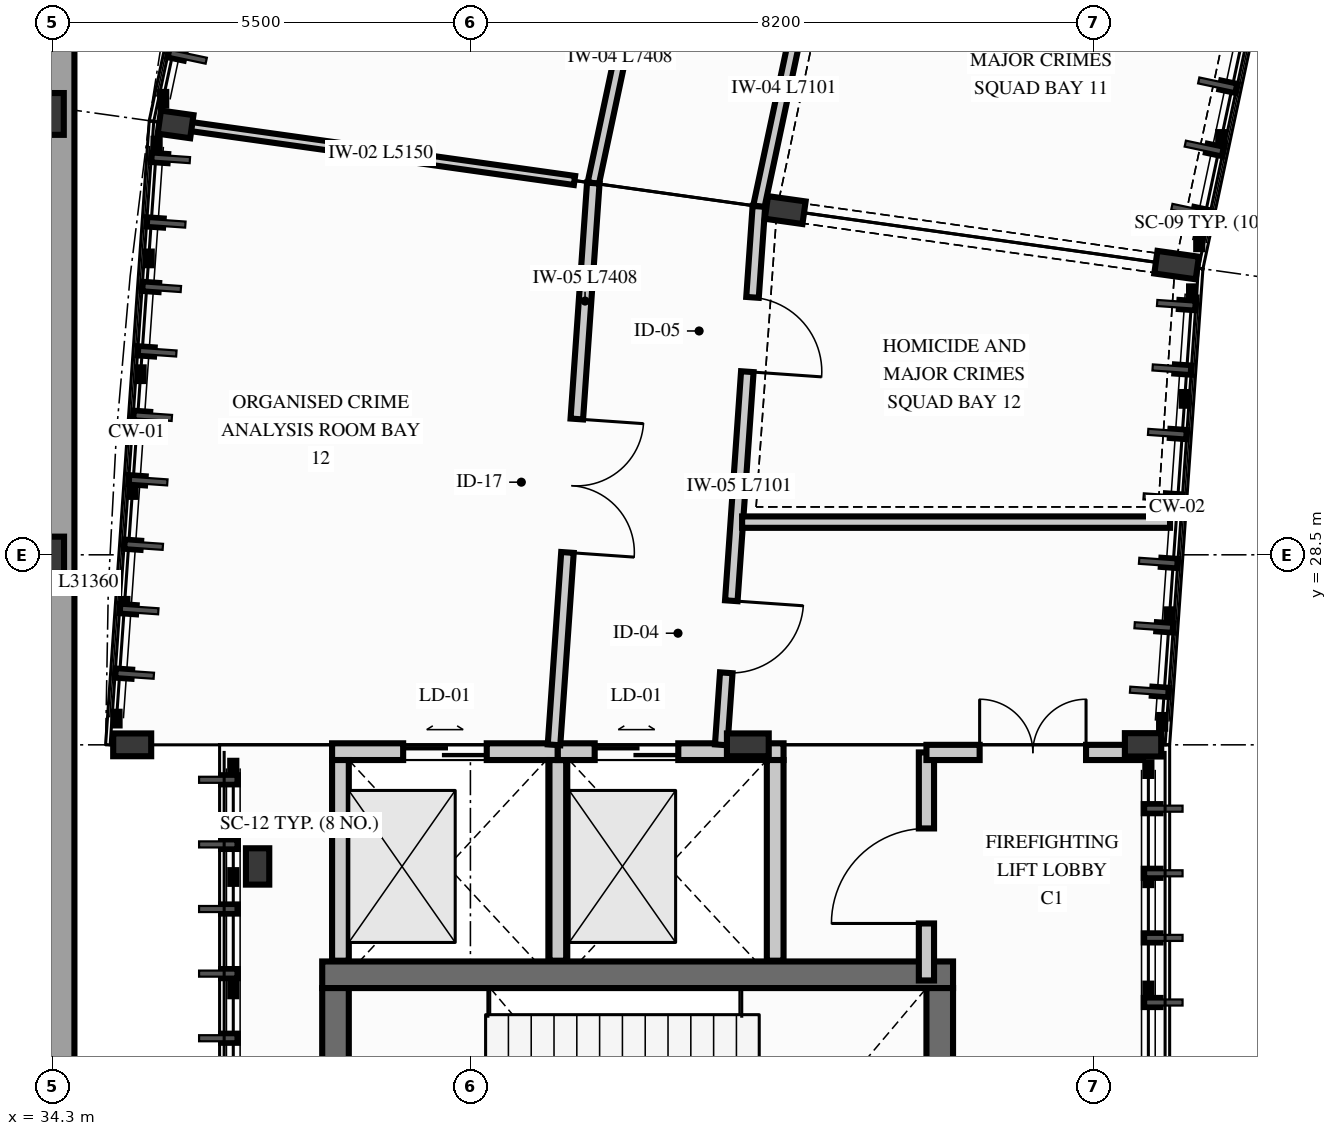
"""IFC4 building model, lengths in metres.
Left out: names, types, materials, properties, quantities, classifications, styles, units other than length and angle.
Written with IfcOpenShell. Run it as: python <this file> out.ifc"""

import sys

from ifc_helpers import new_model, si_unit, direction, frame, frame_2d, origin, origin_2d, place, context, subcontext, project, spatial, rectangle, i_section, extrude, element, fill, save


model = new_model("IFC4")
c1 = context("Model", 3, precision=1e-05, world=origin(), true_north=direction((0.0, 1.0)))
c2 = subcontext(c1, "Body", "Model", "MODEL_VIEW")
j1 = project(units=[si_unit("LENGTHUNIT", "METRE"), si_unit("PLANEANGLEUNIT", "RADIAN")], contexts=[c1])
p1 = place(None, origin())
s1 = spatial("IfcSite", under=j1, at=p1, CompositionType="ELEMENT")
p2 = place(p1, origin())
s2 = spatial("IfcBuilding", under=s1, at=p2, CompositionType="ELEMENT")
p3 = place(p2, frame((0.0, 0.0, 9.3)))
s3 = spatial("IfcBuildingStorey", under=s2, at=p3, CompositionType="ELEMENT", Elevation=9.3)
p4 = place(p3, frame((37.85, 22.975, 0.0), z_axis=(0.0, 0.0, 1.0), x_axis=(1.0, 0.0, 0.0)))
e1 = element("IfcWall", 1, at=p4, inside=s3, PredefinedType="SHEAR", context=c2, shape_type="SweptSolid", body=[
    extrude(rectangle(XDim=8.3, YDim=0.35, at=frame_2d((4.15, 0.0))), origin(), (0.0, 0.0, 1.0), 4.0),
])
p5 = place(p3, frame((38.025, 16.0, 0.0), z_axis=(0.0, 0.0, 1.0), x_axis=(0.0, 1.0, 0.0)))
e2 = element("IfcWall", 2, at=p5, inside=s3, PredefinedType="SHEAR", context=c2, shape_type="SweptSolid", body=[
    extrude(rectangle(XDim=6.8, YDim=0.35, at=frame_2d((3.4, 0.0))), origin(), (0.0, 0.0, 1.0), 4.0),
])
p6 = place(p5, frame((2.6, 0.0, 0.0)))
e3 = element("IfcOpeningElement", 3, at=p6, cuts=e2, PredefinedType="OPENING", context=c2, shape_type="SweptSolid", body=[
    extrude(rectangle(XDim=1.25, YDim=2.2, at=frame_2d((0.625, 1.1))), frame((0.0, 0.185, 0.0), z_axis=(0.0, -1.0, 0.0), x_axis=(1.0, 0.0, 0.0)), (0.0, 0.0, 1.0), 0.37),
])
p7 = place(p3, frame((45.975, 16.0, 0.0), z_axis=(0.0, 0.0, 1.0), x_axis=(0.0, 1.0, 0.0)))
e4 = element("IfcWall", 4, at=p7, inside=s3, PredefinedType="SHEAR", context=c2, shape_type="SweptSolid", body=[
    extrude(rectangle(XDim=6.8, YDim=0.35, at=frame_2d((3.4, 0.0))), origin(), (0.0, 0.0, 1.0), 4.0),
])
p8 = place(p3, frame((49.091, 32.312, 0.0), z_axis=(0.0, 0.0, 1.0), x_axis=(0.13917310096, 0.990268068742, 0.0)))
e5 = element("IfcColumn", 5, at=p8, inside=s3, PredefinedType="COLUMN", context=c2, shape_type="SweptSolid", body=[
    extrude(i_section(OverallWidth=0.3, OverallDepth=0.55, WebThickness=0.015, FlangeThickness=0.029, FilletRadius=0.027, at=origin_2d()), origin(), (0.0, 0.0, 1.0), 4.2),
])
p9 = place(p3, frame((43.942, 33.035, 0.0), z_axis=(0.0, 0.0, 1.0), x_axis=(0.13917310096, 0.990268068742, 0.0)))
e6 = element("IfcColumn", 6, at=p9, inside=s3, PredefinedType="COLUMN", context=c2, shape_type="SweptSolid", body=[
    extrude(i_section(OverallWidth=0.3, OverallDepth=0.5, WebThickness=0.014, FlangeThickness=0.028, FilletRadius=0.027, at=origin_2d()), origin(), (0.0, 0.0, 1.0), 4.2),
])
p10 = place(p3, frame((35.921, 34.163, 0.0), z_axis=(0.0, 0.0, 1.0), x_axis=(0.13917310096, 0.990268068742, 0.0)))
e7 = element("IfcColumn", 7, at=p10, inside=s3, PredefinedType="COLUMN", context=c2, shape_type="SweptSolid", body=[
    extrude(i_section(OverallWidth=0.307, OverallDepth=0.432, WebThickness=0.021, FlangeThickness=0.04, FilletRadius=0.027, at=origin_2d()), origin(), (0.0, 0.0, 1.0), 4.2),
])
p11 = place(p3, frame((48.65, 26.0, 0.0), z_axis=(0.0, 0.0, 1.0), x_axis=(0.0, 1.0, 0.0)))
e8 = element("IfcColumn", 8, at=p11, inside=s3, PredefinedType="COLUMN", context=c2, shape_type="SweptSolid", body=[
    extrude(i_section(OverallWidth=0.307, OverallDepth=0.478, WebThickness=0.021, FlangeThickness=0.04, FilletRadius=0.027, at=origin_2d()), origin(), (0.0, 0.0, 1.0), 4.2),
])
p12 = place(p3, frame((43.45, 26.0, 0.0), z_axis=(0.0, 0.0, 1.0), x_axis=(0.0, 1.0, 0.0)))
e9 = element("IfcColumn", 9, at=p12, inside=s3, PredefinedType="COLUMN", context=c2, shape_type="SweptSolid", body=[
    extrude(i_section(OverallWidth=0.3, OverallDepth=0.55, WebThickness=0.015, FlangeThickness=0.029, FilletRadius=0.027, at=origin_2d()), origin(), (0.0, 0.0, 1.0), 4.2),
])
p13 = place(p3, frame((35.35, 26.0, 0.0), z_axis=(0.0, 0.0, 1.0), x_axis=(0.0, 1.0, 0.0)))
e10 = element("IfcColumn", 10, at=p13, inside=s3, PredefinedType="COLUMN", context=c2, shape_type="SweptSolid", body=[
    extrude(i_section(OverallWidth=0.3, OverallDepth=0.5, WebThickness=0.014, FlangeThickness=0.028, FilletRadius=0.027, at=origin_2d()), origin(), (0.0, 0.0, 1.0), 4.2),
])
p14 = place(p3, frame((37.0, 24.4, 0.0), z_axis=(0.0, 0.0, 1.0), x_axis=(1.0, 0.0, 0.0)))
e11 = element("IfcColumn", 11, at=p14, inside=s3, PredefinedType="COLUMN", context=c2, shape_type="SweptSolid", body=[
    extrude(i_section(OverallWidth=0.307, OverallDepth=0.478, WebThickness=0.021, FlangeThickness=0.04, FilletRadius=0.027, at=origin_2d()), origin(), (0.0, 0.0, 1.0), 4.2),
])
p15 = place(p3, frame((34.3, 28.5, 0.0), z_axis=(0.0, 0.0, 1.0), x_axis=(1.0, 0.0, 0.0)))
e12 = element("IfcColumn", 12, at=p15, inside=s3, PredefinedType="COLUMN", context=c2, shape_type="SweptSolid", body=[
    extrude(i_section(OverallWidth=0.307, OverallDepth=0.478, WebThickness=0.021, FlangeThickness=0.04, FilletRadius=0.027, at=origin_2d()), origin(), (0.0, 0.0, 1.0), 3.94),
])
p16 = place(p3, frame((34.3, 34.3, 0.0), z_axis=(0.0, 0.0, 1.0), x_axis=(1.0, 0.0, 0.0)))
e13 = element("IfcColumn", 13, at=p16, inside=s3, PredefinedType="COLUMN", context=c2, shape_type="SweptSolid", body=[
    extrude(i_section(OverallWidth=0.3, OverallDepth=0.55, WebThickness=0.015, FlangeThickness=0.029, FilletRadius=0.027, at=origin_2d()), origin(), (0.0, 0.0, 1.0), 3.94),
])
p17 = place(p3, frame((34.38, 4.93, 0.0), z_axis=(0.0, 0.0, 1.0), x_axis=(0.0, 1.0, 0.0)))
e14 = element("IfcWall", 14, at=p17, inside=s3, PredefinedType="SOLIDWALL", context=c2, shape_type="SweptSolid", body=[
    extrude(rectangle(XDim=31.36, YDim=0.42, at=frame_2d((15.68, 0.0))), origin(), (0.0, 0.0, 1.0), 3.62),
])
p18 = place(p17, frame((1.65, 0.0, 0.85)))
e15 = element("IfcOpeningElement", 15, at=p18, cuts=e14, PredefinedType="OPENING", context=c2, shape_type="SweptSolid", body=[
    extrude(rectangle(XDim=1.3, YDim=2.15, at=frame_2d((0.65, 1.075))), frame((0.0, 0.22, 0.0), z_axis=(0.0, -1.0, 0.0), x_axis=(1.0, 0.0, 0.0)), (0.0, 0.0, 1.0), 0.44),
])
p19 = place(p17, frame((9.65, 0.0, 0.74)))
e16 = element("IfcOpeningElement", 16, at=p19, cuts=e14, PredefinedType="OPENING", context=c2, shape_type="SweptSolid", body=[
    extrude(rectangle(XDim=1.6, YDim=2.4, at=frame_2d((0.8, 1.2))), frame((0.0, 0.22, 0.0), z_axis=(0.0, -1.0, 0.0), x_axis=(1.0, 0.0, 0.0)), (0.0, 0.0, 1.0), 0.44),
])
p20 = place(p17, frame((13.65, 0.0, 0.85)))
e17 = element("IfcOpeningElement", 17, at=p20, cuts=e14, PredefinedType="OPENING", context=c2, shape_type="SweptSolid", body=[
    extrude(rectangle(XDim=1.4, YDim=2.2, at=frame_2d((0.7, 1.1))), frame((0.0, 0.22, 0.0), z_axis=(0.0, -1.0, 0.0), x_axis=(1.0, 0.0, 0.0)), (0.0, 0.0, 1.0), 0.44),
])
p21 = place(p3, frame((37.98, 25.91, 0.0), z_axis=(0.0, 0.0, 1.0), x_axis=(1.0, 0.0, 0.0)))
e18 = element("IfcWall", 18, at=p21, inside=s3, PredefinedType="PARTITIONING", context=c2, shape_type="SweptSolid", body=[
    extrude(rectangle(XDim=2.97, YDim=0.22, at=frame_2d((1.485, 0.0))), origin(), (0.0, 0.0, 1.0), 3.55),
])
p22 = place(p21, frame((0.935, 0.0, 0.0)))
e19 = element("IfcOpeningElement", 19, at=p22, cuts=e18, PredefinedType="OPENING", context=c2, shape_type="SweptSolid", body=[
    extrude(rectangle(XDim=1.1, YDim=2.15, at=frame_2d((0.55, 1.075))), frame((0.0, 0.12, 0.0), z_axis=(0.0, -1.0, 0.0), x_axis=(1.0, 0.0, 0.0)), (0.0, 0.0, 1.0), 0.24),
])
for number, where, z_axis, x_axis in (
    (20, (38.09, 23.16, 0.0), (0.0, 0.0, 1.0), (0.0, 1.0, 0.0)),
    (21, (40.95, 23.16, 0.0), (0.0, 0.0, 1.0), (0.0, 1.0, 0.0)),
):
    element("IfcWall", number, at=place(p3, frame(where, z_axis=z_axis, x_axis=x_axis)), inside=s3, PredefinedType="PARTITIONING", context=c2, shape_type="SweptSolid", body=[
        extrude(rectangle(XDim=2.64, YDim=0.22, at=frame_2d((1.32, 0.0))), origin(), (0.0, 0.0, 1.0), 3.92),
    ])
p23 = place(p3, frame((40.95, 25.91, 0.0), z_axis=(0.0, 0.0, 1.0), x_axis=(1.0, 0.0, 0.0)))
e22 = element("IfcWall", 22, at=p23, inside=s3, PredefinedType="PARTITIONING", context=c2, shape_type="SweptSolid", body=[
    extrude(rectangle(XDim=2.97, YDim=0.22, at=frame_2d((1.485, 0.0))), origin(), (0.0, 0.0, 1.0), 3.55),
])
p24 = place(p23, frame((0.485, 0.0, 0.0)))
e23 = element("IfcOpeningElement", 23, at=p24, cuts=e22, PredefinedType="OPENING", context=c2, shape_type="SweptSolid", body=[
    extrude(rectangle(XDim=1.1, YDim=2.15, at=frame_2d((0.55, 1.075))), frame((0.0, 0.12, 0.0), z_axis=(0.0, -1.0, 0.0), x_axis=(1.0, 0.0, 0.0)), (0.0, 0.0, 1.0), 0.24),
])
p25 = place(p3, frame((43.81, 23.16, 0.0), z_axis=(0.0, 0.0, 1.0), x_axis=(0.0, 1.0, 0.0)))
e24 = element("IfcWall", 24, at=p25, inside=s3, PredefinedType="PARTITIONING", context=c2, shape_type="SweptSolid", body=[
    extrude(rectangle(XDim=2.64, YDim=0.22, at=frame_2d((1.32, 0.0))), origin(), (0.0, 0.0, 1.0), 3.92),
])
p26 = place(p3, frame((45.8, 22.9, 0.0), z_axis=(0.0, 0.0, 1.0), x_axis=(0.0, 1.0, 0.0)))
e25 = element("IfcWall", 25, at=p26, inside=s3, PredefinedType="PARTITIONING", context=c2, shape_type="SweptSolid", body=[
    extrude(rectangle(XDim=3.0, YDim=0.2, at=frame_2d((1.5, 0.0))), origin(), (0.0, 0.0, 1.0), 3.92),
])
p27 = place(p26, frame((0.75, 0.0, 0.0)))
e26 = element("IfcOpeningElement", 26, at=p27, cuts=e25, PredefinedType="OPENING", context=c2, shape_type="SweptSolid", body=[
    extrude(rectangle(XDim=1.25, YDim=2.2, at=frame_2d((0.625, 1.1))), frame((0.0, 0.11, 0.0), z_axis=(0.0, -1.0, 0.0), x_axis=(1.0, 0.0, 0.0)), (0.0, 0.0, 1.0), 0.22),
])
p28 = place(p3, frame((45.8, 25.9, 0.0), z_axis=(0.0, 0.0, 1.0), x_axis=(1.0, 0.0, 0.0)))
e27 = element("IfcWall", 27, at=p28, inside=s3, PredefinedType="PARTITIONING", context=c2, shape_type="SweptSolid", body=[
    extrude(rectangle(XDim=2.85, YDim=0.2, at=frame_2d((1.425, 0.0))), origin(), (0.0, 0.0, 1.0), 3.6),
])
p29 = place(p28, frame((0.7, 0.0, 0.0)))
e28 = element("IfcOpeningElement", 28, at=p29, cuts=e27, PredefinedType="OPENING", context=c2, shape_type="SweptSolid", body=[
    extrude(rectangle(XDim=1.4, YDim=2.25, at=frame_2d((0.7, 1.125))), frame((0.0, 0.11, 0.0), z_axis=(0.0, -1.0, 0.0), x_axis=(1.0, 0.0, 0.0)), (0.0, 0.0, 1.0), 0.22),
])
p30 = place(p3, frame((45.072, 40.03, 0.0), z_axis=(0.0, 0.0, 1.0), x_axis=(-0.207903987445, -0.978149238104, 0.0)))
e29 = element("IfcWall", 29, at=p30, inside=s3, PredefinedType="PARTITIONING", context=c2, shape_type="SweptSolid", body=[
    extrude(rectangle(XDim=7.101, YDim=0.15, at=frame_2d((3.551, 0.0))), origin(), (0.0, 0.0, 1.0), 3.92),
])
p31 = place(p30, frame((2.982, 0.0, 0.0)))
e30 = element("IfcOpeningElement", 30, at=p31, cuts=e29, PredefinedType="OPENING", context=c2, shape_type="SweptSolid", body=[
    extrude(rectangle(XDim=0.95, YDim=2.15, at=frame_2d((0.475, 1.075))), frame((0.0, 0.085, 0.0), z_axis=(0.0, -1.0, 0.0), x_axis=(1.0, 0.0, 0.0)), (0.0, 0.0, 1.0), 0.17),
])
p32 = place(p3, frame((42.957, 40.636, 0.0), z_axis=(0.0, 0.0, 1.0), x_axis=(-0.207921820376, -0.978145447575, 0.0)))
e31 = element("IfcWall", 31, at=p32, inside=s3, PredefinedType="PARTITIONING", context=c2, shape_type="SweptSolid", body=[
    extrude(rectangle(XDim=7.408, YDim=0.15, at=frame_2d((3.704, 0.0))), origin(), (0.0, 0.0, 1.0), 3.92),
])
p33 = place(p32, frame((3.111, 0.0, 0.0)))
e32 = element("IfcOpeningElement", 32, at=p33, cuts=e31, PredefinedType="OPENING", context=c2, shape_type="SweptSolid", body=[
    extrude(rectangle(XDim=0.9, YDim=2.1, at=frame_2d((0.45, 1.05))), frame((0.0, 0.085, 0.0), z_axis=(0.0, -1.0, 0.0), x_axis=(1.0, 0.0, 0.0)), (0.0, 0.0, 1.0), 0.17),
])
p34 = place(p3, frame((41.169, 33.425, 0.0), z_axis=(0.0, 0.0, 1.0), x_axis=(-0.990266484291, 0.13918437445, 0.0)))
e33 = element("IfcWall", 33, at=p34, inside=s3, PredefinedType="PARTITIONING", context=c2, shape_type="SweptSolid", body=[
    extrude(rectangle(XDim=5.15, YDim=0.12, at=frame_2d((2.575, 0.0))), origin(), (0.0, 0.0, 1.0), 3.55),
])
p35 = place(p3, frame((43.595, 33.084, 0.0), z_axis=(0.0, 0.0, 1.0), x_axis=(-0.069756597752, -0.997564041588, 0.0)))
e34 = element("IfcWall", 34, at=p35, inside=s3, PredefinedType="PARTITIONING", context=c2, shape_type="SweptSolid", body=[
    extrude(rectangle(XDim=7.101, YDim=0.165, at=frame_2d((3.551, 0.0))), origin(), (0.0, 0.0, 1.0), 3.92),
])
p36 = place(p35, frame((5.201, 0.0, 0.0)))
e35 = element("IfcOpeningElement", 35, at=p36, cuts=e34, PredefinedType="OPENING", context=c2, shape_type="SweptSolid", body=[
    extrude(rectangle(XDim=0.95, YDim=2.15, at=frame_2d((0.475, 1.075))), frame((0.0, 0.093, 0.0), z_axis=(0.0, -1.0, 0.0), x_axis=(1.0, 0.0, 0.0)), (0.0, 0.0, 1.0), 0.185),
])
p37 = place(p35, frame((1.2, 0.0, 0.0)))
e36 = element("IfcOpeningElement", 36, at=p37, cuts=e34, PredefinedType="OPENING", context=c2, shape_type="SweptSolid", body=[
    extrude(rectangle(XDim=0.98, YDim=2.16, at=frame_2d((0.49, 1.08))), frame((0.0, 0.093, 0.0), z_axis=(0.0, -1.0, 0.0), x_axis=(1.0, 0.0, 0.0)), (0.0, 0.0, 1.0), 0.185),
])
p38 = place(p3, frame((41.417, 33.39, 0.0), z_axis=(0.0, 0.0, 1.0), x_axis=(-0.069766817412, -0.997563326906, 0.0)))
e37 = element("IfcWall", 37, at=p38, inside=s3, PredefinedType="PARTITIONING", context=c2, shape_type="SweptSolid", body=[
    extrude(rectangle(XDim=7.408, YDim=0.165, at=frame_2d((3.704, 0.0))), origin(), (0.0, 0.0, 1.0), 3.92),
])
p39 = place(p38, frame((3.111, 0.0, 0.0)))
e38 = element("IfcOpeningElement", 38, at=p39, cuts=e37, PredefinedType="OPENING", context=c2, shape_type="SweptSolid", body=[
    extrude(rectangle(XDim=1.76, YDim=2.36, at=frame_2d((0.88, 1.18))), frame((0.0, 0.093, 0.0), z_axis=(0.0, -1.0, 0.0), x_axis=(1.0, 0.0, 0.0)), (0.0, 0.0, 1.0), 0.185),
])
p40 = place(p3, frame((43.375, 28.93, 0.0), z_axis=(0.0, 0.0, 1.0), x_axis=(1.0, 0.0, 0.0)))
e39 = element("IfcWall", 39, at=p40, inside=s3, PredefinedType="PARTITIONING", context=c2, shape_type="SweptSolid", body=[
    extrude(rectangle(XDim=5.63, YDim=0.15, at=frame_2d((2.815, 0.0))), origin(), (0.0, 0.0, 1.0), 3.698),
])
p41 = place(p22, origin())
e40 = element("IfcDoor", 40, at=p41, inside=s3, OperationType="DOUBLE_DOOR_SLIDING", PredefinedType="DOOR", context=c2, shape_type="SweptSolid", body=[
    extrude(rectangle(XDim=1.1, YDim=2.15, at=frame_2d((0.55, 1.075))), frame((0.0, 0.025, 0.0), z_axis=(0.0, -1.0, 0.0), x_axis=(1.0, 0.0, 0.0)), (0.0, 0.0, 1.0), 0.05),
])
fill(e19, e40)
p42 = place(p24, origin())
e41 = element("IfcDoor", 41, at=p42, inside=s3, OperationType="DOUBLE_DOOR_SLIDING", PredefinedType="DOOR", context=c2, shape_type="SweptSolid", body=[
    extrude(rectangle(XDim=1.1, YDim=2.15, at=frame_2d((0.55, 1.075))), frame((0.0, 0.025, 0.0), z_axis=(0.0, -1.0, 0.0), x_axis=(1.0, 0.0, 0.0)), (0.0, 0.0, 1.0), 0.05),
])
fill(e23, e41)
p43 = place(p29, origin())
e42 = element("IfcDoor", 42, at=p43, inside=s3, OperationType="DOUBLE_DOOR_SINGLE_SWING", PredefinedType="DOOR", context=c2, shape_type="SweptSolid", body=[
    extrude(rectangle(XDim=1.4, YDim=2.25, at=frame_2d((0.7, 1.125))), frame((0.0, 0.025, 0.0), z_axis=(0.0, -1.0, 0.0), x_axis=(1.0, 0.0, 0.0)), (0.0, 0.0, 1.0), 0.05),
])
fill(e28, e42)
p44 = place(p27, origin())
e43 = element("IfcDoor", 43, at=p44, inside=s3, OperationType="SINGLE_SWING_LEFT", PredefinedType="DOOR", context=c2, shape_type="SweptSolid", body=[
    extrude(rectangle(XDim=1.25, YDim=2.2, at=frame_2d((0.625, 1.1))), frame((0.0, 0.025, 0.0), z_axis=(0.0, -1.0, 0.0), x_axis=(1.0, 0.0, 0.0)), (0.0, 0.0, 1.0), 0.05),
])
fill(e26, e43)
p45 = place(p36, origin())
e44 = element("IfcDoor", 44, at=p45, inside=s3, OperationType="SINGLE_SWING_LEFT", PredefinedType="DOOR", context=c2, shape_type="SweptSolid", body=[
    extrude(rectangle(XDim=0.95, YDim=2.15, at=frame_2d((0.475, 1.075))), frame((0.0, 0.025, 0.0), z_axis=(0.0, -1.0, 0.0), x_axis=(1.0, 0.0, 0.0)), (0.0, 0.0, 1.0), 0.05),
])
fill(e35, e44)
p46 = place(p37, origin())
e45 = element("IfcDoor", 45, at=p46, inside=s3, OperationType="SINGLE_SWING_RIGHT", PredefinedType="DOOR", context=c2, shape_type="SweptSolid", body=[
    extrude(rectangle(XDim=0.98, YDim=2.16, at=frame_2d((0.49, 1.08))), frame((0.0, 0.025, 0.0), z_axis=(0.0, -1.0, 0.0), x_axis=(1.0, 0.0, 0.0)), (0.0, 0.0, 1.0), 0.05),
])
fill(e36, e45)
p47 = place(p39, origin())
e46 = element("IfcDoor", 46, at=p47, inside=s3, OperationType="DOUBLE_DOOR_SINGLE_SWING", PredefinedType="DOOR", context=c2, shape_type="SweptSolid", body=[
    extrude(rectangle(XDim=1.76, YDim=2.36, at=frame_2d((0.88, 1.18))), frame((0.0, 0.025, 0.0), z_axis=(0.0, -1.0, 0.0), x_axis=(1.0, 0.0, 0.0)), (0.0, 0.0, 1.0), 0.05),
])
fill(e38, e46)
save(model, sys.argv[1])
